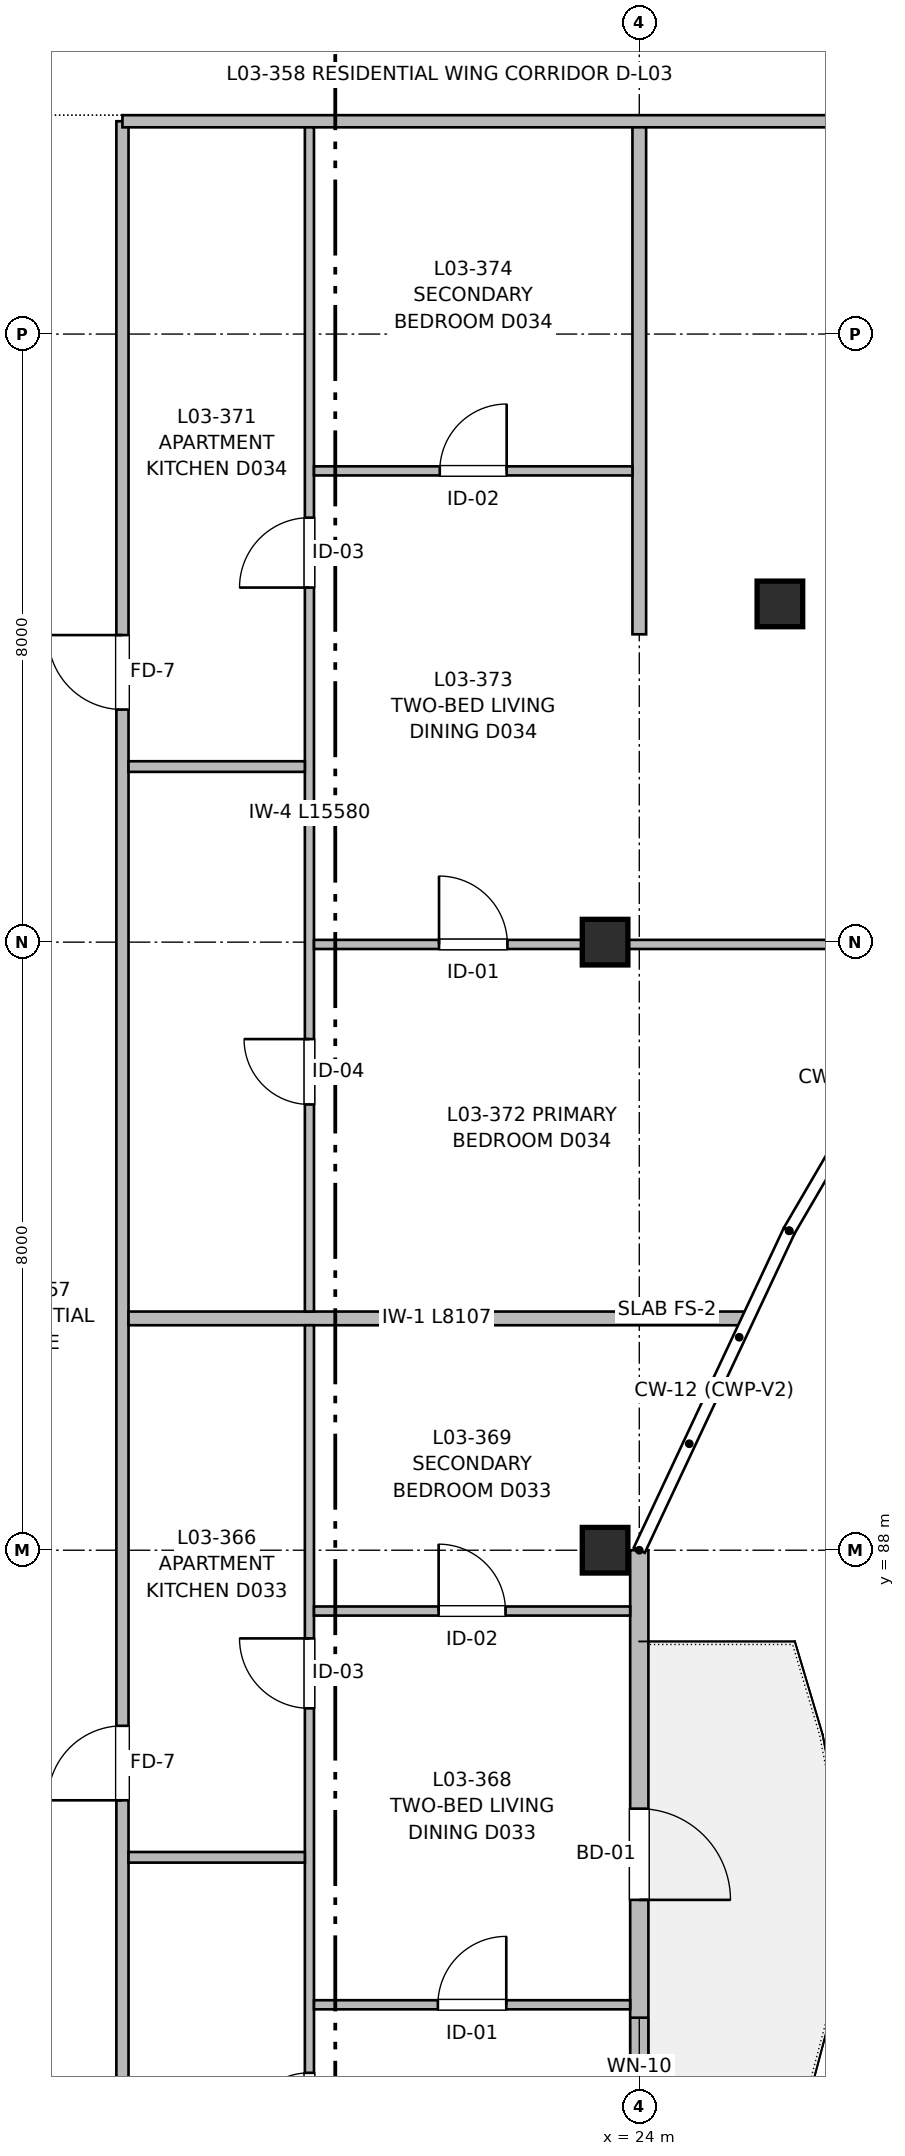
"""IFC4 building model, lengths in metres.
Left out: names, types, materials, properties, quantities, classifications, styles, units other than length and angle.
Written with IfcOpenShell. Run it as: python <this file> out.ifc"""

import sys

from ifc_helpers import new_model, si_unit, direction, frame, frame_2d, origin, origin_2d, place, context, subcontext, project, spatial, rectangle, extrude, element, fill, save


model = new_model("IFC4")
c1 = context("Model", 3, precision=1e-05, world=origin(), true_north=direction((0.0, 1.0)))
c2 = subcontext(c1, "Body", "Model", "MODEL_VIEW")
j1 = project(units=[si_unit("LENGTHUNIT", "METRE"), si_unit("PLANEANGLEUNIT", "RADIAN")], contexts=[c1])
p1 = place(None, origin())
s1 = spatial("IfcSite", under=j1, at=p1, CompositionType="ELEMENT")
p2 = place(p1, origin())
s2 = spatial("IfcBuilding", under=s1, at=p2, CompositionType="ELEMENT")
p3 = place(p2, frame((0.0, 0.0, 10.56)))
s3 = spatial("IfcBuildingStorey", under=s2, at=p3, CompositionType="ELEMENT", Elevation=10.56)
for number, where, z_axis, x_axis in (
    (1, (23.55, 88.0, 0.0), (0.0, 0.0, 1.0), (1.0, 0.0, 0.0)),
    (2, (23.55, 96.0, 0.0), (0.0, 0.0, 1.0), (1.0, 0.0, 0.0)),
    (3, (25.85, 100.45, 0.0), (0.0, 0.0, 1.0), (1.0, 0.0, 0.0)),
):
    element("IfcColumn", number, at=place(p3, frame(where, z_axis=z_axis, x_axis=x_axis)), inside=s3, PredefinedType="COLUMN", context=c2, shape_type="SweptSolid", body=[
        extrude(rectangle(XDim=0.6, YDim=0.6, at=origin_2d()), origin(), (0.0, 0.0, 1.0), 3.2),
    ])
p4 = place(p3, frame((24.0, 88.0, 0.0), z_axis=(0.0, 0.0, 1.0), x_axis=(0.0, -1.0, 0.0)))
e4 = element("IfcWall", 4, at=p4, inside=s3, PredefinedType="SOLIDWALL", context=c2, shape_type="SweptSolid", body=[
    extrude(rectangle(XDim=32.0, YDim=0.24, at=frame_2d((16.0, 0.0))), origin(), (0.0, 0.0, 1.0), 2.98),
])
p5 = place(p4, frame((3.4, 0.0, 0.0)))
e5 = element("IfcOpeningElement", 5, at=p5, cuts=e4, PredefinedType="OPENING", context=c2, shape_type="SweptSolid", body=[
    extrude(rectangle(XDim=1.2, YDim=2.2, at=frame_2d((0.6, 1.1))), frame((0.0, 0.13, 0.0), z_axis=(0.0, -1.0, 0.0), x_axis=(1.0, 0.0, 0.0)), (0.0, 0.0, 1.0), 0.26),
])
p6 = place(p4, frame((6.15, 0.0, 0.82)))
e6 = element("IfcOpeningElement", 6, at=p6, cuts=e4, PredefinedType="OPENING", context=c2, shape_type="SweptSolid", body=[
    extrude(rectangle(XDim=1.3, YDim=1.4, at=frame_2d((0.65, 0.7))), frame((0.0, 0.13, 0.0), z_axis=(0.0, -1.0, 0.0), x_axis=(1.0, 0.0, 0.0)), (0.0, 0.0, 1.0), 0.26),
])
p7 = place(p4, frame((11.3, 0.0, 0.87)))
e7 = element("IfcOpeningElement", 7, at=p7, cuts=e4, PredefinedType="OPENING", context=c2, shape_type="SweptSolid", body=[
    extrude(rectangle(XDim=1.4, YDim=1.35, at=frame_2d((0.7, 0.675))), frame((0.0, 0.13, 0.0), z_axis=(0.0, -1.0, 0.0), x_axis=(1.0, 0.0, 0.0)), (0.0, 0.0, 1.0), 0.26),
])
p8 = place(p4, frame((19.375, 0.0, 0.87)))
e8 = element("IfcOpeningElement", 8, at=p8, cuts=e4, PredefinedType="OPENING", context=c2, shape_type="SweptSolid", body=[
    extrude(rectangle(XDim=1.25, YDim=1.35, at=frame_2d((0.625, 0.675))), frame((0.0, 0.13, 0.0), z_axis=(0.0, -1.0, 0.0), x_axis=(1.0, 0.0, 0.0)), (0.0, 0.0, 1.0), 0.26),
])
p9 = place(p4, frame((27.35, 0.0, 0.82)))
e9 = element("IfcOpeningElement", 9, at=p9, cuts=e4, PredefinedType="OPENING", context=c2, shape_type="SweptSolid", body=[
    extrude(rectangle(XDim=1.3, YDim=1.4, at=frame_2d((0.65, 0.7))), frame((0.0, 0.13, 0.0), z_axis=(0.0, -1.0, 0.0), x_axis=(1.0, 0.0, 0.0)), (0.0, 0.0, 1.0), 0.26),
])
p10 = place(p3, frame((17.2, 56.18, 0.0), z_axis=(0.0, 0.0, 1.0), x_axis=(0.0, 1.0, 0.0)))
e10 = element("IfcWall", 10, at=p10, inside=s3, PredefinedType="PARTITIONING", context=c2, shape_type="SweptSolid", body=[
    extrude(rectangle(XDim=50.62, YDim=0.16, at=frame_2d((25.31, 0.0))), origin(), (0.0, 0.0, 1.0), 2.935),
])
p11 = place(p10, frame((4.51, 0.0, 0.0)))
e11 = element("IfcOpeningElement", 11, at=p11, cuts=e10, PredefinedType="OPENING", context=c2, shape_type="SweptSolid", body=[
    extrude(rectangle(XDim=1.5, YDim=2.2, at=frame_2d((0.75, 1.1))), frame((0.0, 0.09, 0.0), z_axis=(0.0, -1.0, 0.0), x_axis=(1.0, 0.0, 0.0)), (0.0, 0.0, 1.0), 0.18),
])
p12 = place(p10, frame((16.48, 0.0, 0.0)))
e12 = element("IfcOpeningElement", 12, at=p12, cuts=e10, PredefinedType="OPENING", context=c2, shape_type="SweptSolid", body=[
    extrude(rectangle(XDim=1.02, YDim=2.15, at=frame_2d((0.51, 1.075))), frame((0.0, 0.09, 0.0), z_axis=(0.0, -1.0, 0.0), x_axis=(1.0, 0.0, 0.0)), (0.0, 0.0, 1.0), 0.18),
])
p13 = place(p10, frame((28.53, 0.0, 0.0)))
e13 = element("IfcOpeningElement", 13, at=p13, cuts=e10, PredefinedType="OPENING", context=c2, shape_type="SweptSolid", body=[
    extrude(rectangle(XDim=0.98, YDim=2.15, at=frame_2d((0.49, 1.075))), frame((0.0, 0.09, 0.0), z_axis=(0.0, -1.0, 0.0), x_axis=(1.0, 0.0, 0.0)), (0.0, 0.0, 1.0), 0.18),
])
p14 = place(p10, frame((42.88, 0.0, 0.0)))
e14 = element("IfcOpeningElement", 14, at=p14, cuts=e10, PredefinedType="OPENING", context=c2, shape_type="SweptSolid", body=[
    extrude(rectangle(XDim=0.98, YDim=2.15, at=frame_2d((0.49, 1.075))), frame((0.0, 0.09, 0.0), z_axis=(0.0, -1.0, 0.0), x_axis=(1.0, 0.0, 0.0)), (0.0, 0.0, 1.0), 0.18),
])
p15 = place(p3, frame((17.2, 106.8, 0.0), z_axis=(0.0, 0.0, 1.0), x_axis=(1.0, 0.0, 0.0)))
e15 = element("IfcWall", 15, at=p15, inside=s3, PredefinedType="PARTITIONING", context=c2, shape_type="SweptSolid", body=[
    extrude(rectangle(XDim=17.62, YDim=0.16, at=frame_2d((8.81, 0.0))), origin(), (0.0, 0.0, 1.0), 2.935),
])
p16 = place(p15, frame((13.075, 0.0, 0.0)))
e16 = element("IfcOpeningElement", 16, at=p16, cuts=e15, PredefinedType="OPENING", context=c2, shape_type="SweptSolid", body=[
    extrude(rectangle(XDim=1.05, YDim=2.15, at=frame_2d((0.525, 1.075))), frame((0.0, 0.09, 0.0), z_axis=(0.0, -1.0, 0.0), x_axis=(1.0, 0.0, 0.0)), (0.0, 0.0, 1.0), 0.18),
])
p17 = place(p3, frame((24.0, 100.05, 0.0), z_axis=(0.0, 0.0, 1.0), x_axis=(0.0, 1.0, 0.0)))
e17 = element("IfcWall", 17, at=p17, inside=s3, PredefinedType="PARTITIONING", context=c2, shape_type="SweptSolid", body=[
    extrude(rectangle(XDim=6.67, YDim=0.18, at=frame_2d((3.335, 0.0))), origin(), (0.0, 0.0, 1.0), 2.935),
])
p18 = place(p3, frame((17.28, 91.05, 0.0), z_axis=(0.0, 0.0, 1.0), x_axis=(1.0, 0.0, 0.0)))
e18 = element("IfcWall", 18, at=p18, inside=s3, PredefinedType="PARTITIONING", context=c2, shape_type="SweptSolid", body=[
    extrude(rectangle(XDim=8.107, YDim=0.18, at=frame_2d((4.053, 0.0))), origin(), (0.0, 0.0, 1.0), 2.935),
])
p19 = place(p3, frame((19.66, 78.0, 0.0), z_axis=(0.0, 0.0, 1.0), x_axis=(0.0, 1.0, 0.0)))
e19 = element("IfcWall", 19, at=p19, inside=s3, PredefinedType="PARTITIONING", context=c2, shape_type="SweptSolid", body=[
    extrude(rectangle(XDim=12.96, YDim=0.12, at=frame_2d((6.48, 0.0))), origin(), (0.0, 0.0, 1.0), 2.935),
])
p20 = place(p19, frame((2.265, 0.0, 0.0)))
e20 = element("IfcOpeningElement", 20, at=p20, cuts=e19, PredefinedType="OPENING", context=c2, shape_type="SweptSolid", body=[
    extrude(rectangle(XDim=0.86, YDim=2.1, at=frame_2d((0.43, 1.05))), frame((0.0, 0.07, 0.0), z_axis=(0.0, -1.0, 0.0), x_axis=(1.0, 0.0, 0.0)), (0.0, 0.0, 1.0), 0.14),
])
p21 = place(p19, frame((7.92, 0.0, 0.0)))
e21 = element("IfcOpeningElement", 21, at=p21, cuts=e19, PredefinedType="OPENING", context=c2, shape_type="SweptSolid", body=[
    extrude(rectangle(XDim=0.92, YDim=2.1, at=frame_2d((0.46, 1.05))), frame((0.0, 0.07, 0.0), z_axis=(0.0, -1.0, 0.0), x_axis=(1.0, 0.0, 0.0)), (0.0, 0.0, 1.0), 0.14),
])
p22 = place(p3, frame((17.28, 83.96, 0.0), z_axis=(0.0, 0.0, 1.0), x_axis=(1.0, 0.0, 0.0)))
e22 = element("IfcWall", 22, at=p22, inside=s3, PredefinedType="PARTITIONING", context=c2, shape_type="SweptSolid", body=[
    extrude(rectangle(XDim=2.32, YDim=0.14, at=frame_2d((1.16, 0.0))), origin(), (0.0, 0.0, 1.0), 2.935),
])
p23 = place(p3, frame((19.72, 82.02, 0.0), z_axis=(0.0, 0.0, 1.0), x_axis=(1.0, 0.0, 0.0)))
e23 = element("IfcWall", 23, at=p23, inside=s3, PredefinedType="PARTITIONING", context=c2, shape_type="SweptSolid", body=[
    extrude(rectangle(XDim=4.16, YDim=0.12, at=frame_2d((2.08, 0.0))), origin(), (0.0, 0.0, 1.0), 2.935),
])
p24 = place(p23, frame((1.63, 0.0, 0.0)))
e24 = element("IfcOpeningElement", 24, at=p24, cuts=e23, PredefinedType="OPENING", context=c2, shape_type="SweptSolid", body=[
    extrude(rectangle(XDim=0.9, YDim=2.1, at=frame_2d((0.45, 1.05))), frame((0.0, 0.07, 0.0), z_axis=(0.0, -1.0, 0.0), x_axis=(1.0, 0.0, 0.0)), (0.0, 0.0, 1.0), 0.14),
])
p25 = place(p3, frame((19.72, 87.2, 0.0), z_axis=(0.0, 0.0, 1.0), x_axis=(1.0, 0.0, 0.0)))
e25 = element("IfcWall", 25, at=p25, inside=s3, PredefinedType="PARTITIONING", context=c2, shape_type="SweptSolid", body=[
    extrude(rectangle(XDim=4.16, YDim=0.12, at=frame_2d((2.08, 0.0))), origin(), (0.0, 0.0, 1.0), 2.935),
])
p26 = place(p25, frame((1.64, 0.0, 0.0)))
e26 = element("IfcOpeningElement", 26, at=p26, cuts=e25, PredefinedType="OPENING", context=c2, shape_type="SweptSolid", body=[
    extrude(rectangle(XDim=0.88, YDim=2.1, at=frame_2d((0.44, 1.05))), frame((0.0, 0.07, 0.0), z_axis=(0.0, -1.0, 0.0), x_axis=(1.0, 0.0, 0.0)), (0.0, 0.0, 1.0), 0.14),
])
p27 = place(p3, frame((19.66, 91.14, 0.0), z_axis=(0.0, 0.0, 1.0), x_axis=(0.0, 1.0, 0.0)))
e27 = element("IfcWall", 27, at=p27, inside=s3, PredefinedType="PARTITIONING", context=c2, shape_type="SweptSolid", body=[
    extrude(rectangle(XDim=15.58, YDim=0.12, at=frame_2d((7.79, 0.0))), origin(), (0.0, 0.0, 1.0), 2.935),
])
p28 = place(p27, frame((2.725, 0.0, 0.0)))
e28 = element("IfcOpeningElement", 28, at=p28, cuts=e27, PredefinedType="OPENING", context=c2, shape_type="SweptSolid", body=[
    extrude(rectangle(XDim=0.86, YDim=2.1, at=frame_2d((0.43, 1.05))), frame((0.0, 0.07, 0.0), z_axis=(0.0, -1.0, 0.0), x_axis=(1.0, 0.0, 0.0)), (0.0, 0.0, 1.0), 0.14),
])
p29 = place(p27, frame((9.525, 0.0, 0.0)))
e29 = element("IfcOpeningElement", 29, at=p29, cuts=e27, PredefinedType="OPENING", context=c2, shape_type="SweptSolid", body=[
    extrude(rectangle(XDim=0.92, YDim=2.1, at=frame_2d((0.46, 1.05))), frame((0.0, 0.07, 0.0), z_axis=(0.0, -1.0, 0.0), x_axis=(1.0, 0.0, 0.0)), (0.0, 0.0, 1.0), 0.14),
])
p30 = place(p3, frame((17.28, 98.31, 0.0), z_axis=(0.0, 0.0, 1.0), x_axis=(1.0, 0.0, 0.0)))
e30 = element("IfcWall", 30, at=p30, inside=s3, PredefinedType="PARTITIONING", context=c2, shape_type="SweptSolid", body=[
    extrude(rectangle(XDim=2.32, YDim=0.14, at=frame_2d((1.16, 0.0))), origin(), (0.0, 0.0, 1.0), 2.935),
])
p31 = place(p3, frame((19.72, 95.97, 0.0), z_axis=(0.0, 0.0, 1.0), x_axis=(1.0, 0.0, 0.0)))
e31 = element("IfcWall", 31, at=p31, inside=s3, PredefinedType="PARTITIONING", context=c2, shape_type="SweptSolid", body=[
    extrude(rectangle(XDim=8.403, YDim=0.12, at=frame_2d((4.202, 0.0))), origin(), (0.0, 0.0, 1.0), 2.53),
])
p32 = place(p31, frame((1.645, 0.0, 0.0)))
e32 = element("IfcOpeningElement", 32, at=p32, cuts=e31, PredefinedType="OPENING", context=c2, shape_type="SweptSolid", body=[
    extrude(rectangle(XDim=0.9, YDim=2.1, at=frame_2d((0.45, 1.05))), frame((0.0, 0.07, 0.0), z_axis=(0.0, -1.0, 0.0), x_axis=(1.0, 0.0, 0.0)), (0.0, 0.0, 1.0), 0.14),
])
p33 = place(p3, frame((19.72, 102.2, 0.0), z_axis=(0.0, 0.0, 1.0), x_axis=(1.0, 0.0, 0.0)))
e33 = element("IfcWall", 33, at=p33, inside=s3, PredefinedType="PARTITIONING", context=c2, shape_type="SweptSolid", body=[
    extrude(rectangle(XDim=4.19, YDim=0.12, at=frame_2d((2.095, 0.0))), origin(), (0.0, 0.0, 1.0), 2.935),
])
p34 = place(p33, frame((1.655, 0.0, 0.0)))
e34 = element("IfcOpeningElement", 34, at=p34, cuts=e33, PredefinedType="OPENING", context=c2, shape_type="SweptSolid", body=[
    extrude(rectangle(XDim=0.88, YDim=2.1, at=frame_2d((0.44, 1.05))), frame((0.0, 0.07, 0.0), z_axis=(0.0, -1.0, 0.0), x_axis=(1.0, 0.0, 0.0)), (0.0, 0.0, 1.0), 0.14),
])
p35 = place(p5, origin())
e35 = element("IfcDoor", 35, at=p35, inside=s3, OperationType="SINGLE_SWING_RIGHT", PredefinedType="DOOR", context=c2, shape_type="SweptSolid", body=[
    extrude(rectangle(XDim=1.2, YDim=2.2, at=frame_2d((0.6, 1.1))), frame((0.0, 0.025, 0.0), z_axis=(0.0, -1.0, 0.0), x_axis=(1.0, 0.0, 0.0)), (0.0, 0.0, 1.0), 0.05),
])
fill(e5, e35)
p36 = place(p6, origin())
e36 = element("IfcWindow", 36, at=p36, inside=s3, PartitioningType="SINGLE_PANEL", PredefinedType="WINDOW", context=c2, shape_type="SweptSolid", body=[
    extrude(rectangle(XDim=1.3, YDim=1.4, at=frame_2d((0.65, 0.7))), frame((0.0, 0.03, 0.0), z_axis=(0.0, -1.0, 0.0), x_axis=(1.0, 0.0, 0.0)), (0.0, 0.0, 1.0), 0.06),
])
fill(e6, e36)
p37 = place(p20, origin())
e37 = element("IfcDoor", 37, at=p37, inside=s3, OperationType="SINGLE_SWING_LEFT", PredefinedType="DOOR", context=c2, shape_type="SweptSolid", body=[
    extrude(rectangle(XDim=0.86, YDim=2.1, at=frame_2d((0.43, 1.05))), frame((0.0, 0.025, 0.0), z_axis=(0.0, -1.0, 0.0), x_axis=(1.0, 0.0, 0.0)), (0.0, 0.0, 1.0), 0.05),
])
fill(e20, e37)
p38 = place(p21, origin())
e38 = element("IfcDoor", 38, at=p38, inside=s3, OperationType="SINGLE_SWING_RIGHT", PredefinedType="DOOR", context=c2, shape_type="SweptSolid", body=[
    extrude(rectangle(XDim=0.92, YDim=2.1, at=frame_2d((0.46, 1.05))), frame((0.0, 0.025, 0.0), z_axis=(0.0, -1.0, 0.0), x_axis=(1.0, 0.0, 0.0)), (0.0, 0.0, 1.0), 0.05),
])
fill(e21, e38)
p39 = place(p13, origin())
e39 = element("IfcDoor", 39, at=p39, inside=s3, OperationType="SINGLE_SWING_LEFT", PredefinedType="DOOR", context=c2, shape_type="SweptSolid", body=[
    extrude(rectangle(XDim=0.98, YDim=2.15, at=frame_2d((0.49, 1.075))), frame((0.0, 0.025, 0.0), z_axis=(0.0, -1.0, 0.0), x_axis=(1.0, 0.0, 0.0)), (0.0, 0.0, 1.0), 0.05),
])
fill(e13, e39)
p40 = place(p24, origin())
e40 = element("IfcDoor", 40, at=p40, inside=s3, OperationType="SINGLE_SWING_RIGHT", PredefinedType="DOOR", context=c2, shape_type="SweptSolid", body=[
    extrude(rectangle(XDim=0.9, YDim=2.1, at=frame_2d((0.45, 1.05))), frame((0.0, 0.025, 0.0), z_axis=(0.0, -1.0, 0.0), x_axis=(1.0, 0.0, 0.0)), (0.0, 0.0, 1.0), 0.05),
])
fill(e24, e40)
p41 = place(p26, origin())
e41 = element("IfcDoor", 41, at=p41, inside=s3, OperationType="SINGLE_SWING_LEFT", PredefinedType="DOOR", context=c2, shape_type="SweptSolid", body=[
    extrude(rectangle(XDim=0.88, YDim=2.1, at=frame_2d((0.44, 1.05))), frame((0.0, 0.025, 0.0), z_axis=(0.0, -1.0, 0.0), x_axis=(1.0, 0.0, 0.0)), (0.0, 0.0, 1.0), 0.05),
])
fill(e26, e41)
p42 = place(p28, origin())
e42 = element("IfcDoor", 42, at=p42, inside=s3, OperationType="SINGLE_SWING_RIGHT", PredefinedType="DOOR", context=c2, shape_type="SweptSolid", body=[
    extrude(rectangle(XDim=0.86, YDim=2.1, at=frame_2d((0.43, 1.05))), frame((0.0, 0.025, 0.0), z_axis=(0.0, -1.0, 0.0), x_axis=(1.0, 0.0, 0.0)), (0.0, 0.0, 1.0), 0.05),
])
fill(e28, e42)
p43 = place(p29, origin())
e43 = element("IfcDoor", 43, at=p43, inside=s3, OperationType="SINGLE_SWING_LEFT", PredefinedType="DOOR", context=c2, shape_type="SweptSolid", body=[
    extrude(rectangle(XDim=0.92, YDim=2.1, at=frame_2d((0.46, 1.05))), frame((0.0, 0.025, 0.0), z_axis=(0.0, -1.0, 0.0), x_axis=(1.0, 0.0, 0.0)), (0.0, 0.0, 1.0), 0.05),
])
fill(e29, e43)
p44 = place(p14, origin())
e44 = element("IfcDoor", 44, at=p44, inside=s3, OperationType="SINGLE_SWING_RIGHT", PredefinedType="DOOR", context=c2, shape_type="SweptSolid", body=[
    extrude(rectangle(XDim=0.98, YDim=2.15, at=frame_2d((0.49, 1.075))), frame((0.0, 0.025, 0.0), z_axis=(0.0, -1.0, 0.0), x_axis=(1.0, 0.0, 0.0)), (0.0, 0.0, 1.0), 0.05),
])
fill(e14, e44)
p45 = place(p32, origin())
e45 = element("IfcDoor", 45, at=p45, inside=s3, OperationType="SINGLE_SWING_LEFT", PredefinedType="DOOR", context=c2, shape_type="SweptSolid", body=[
    extrude(rectangle(XDim=0.9, YDim=2.1, at=frame_2d((0.45, 1.05))), frame((0.0, 0.025, 0.0), z_axis=(0.0, -1.0, 0.0), x_axis=(1.0, 0.0, 0.0)), (0.0, 0.0, 1.0), 0.05),
])
fill(e32, e45)
p46 = place(p34, origin())
e46 = element("IfcDoor", 46, at=p46, inside=s3, OperationType="SINGLE_SWING_RIGHT", PredefinedType="DOOR", context=c2, shape_type="SweptSolid", body=[
    extrude(rectangle(XDim=0.88, YDim=2.1, at=frame_2d((0.44, 1.05))), frame((0.0, 0.025, 0.0), z_axis=(0.0, -1.0, 0.0), x_axis=(1.0, 0.0, 0.0)), (0.0, 0.0, 1.0), 0.05),
])
fill(e34, e46)
save(model, sys.argv[1])
